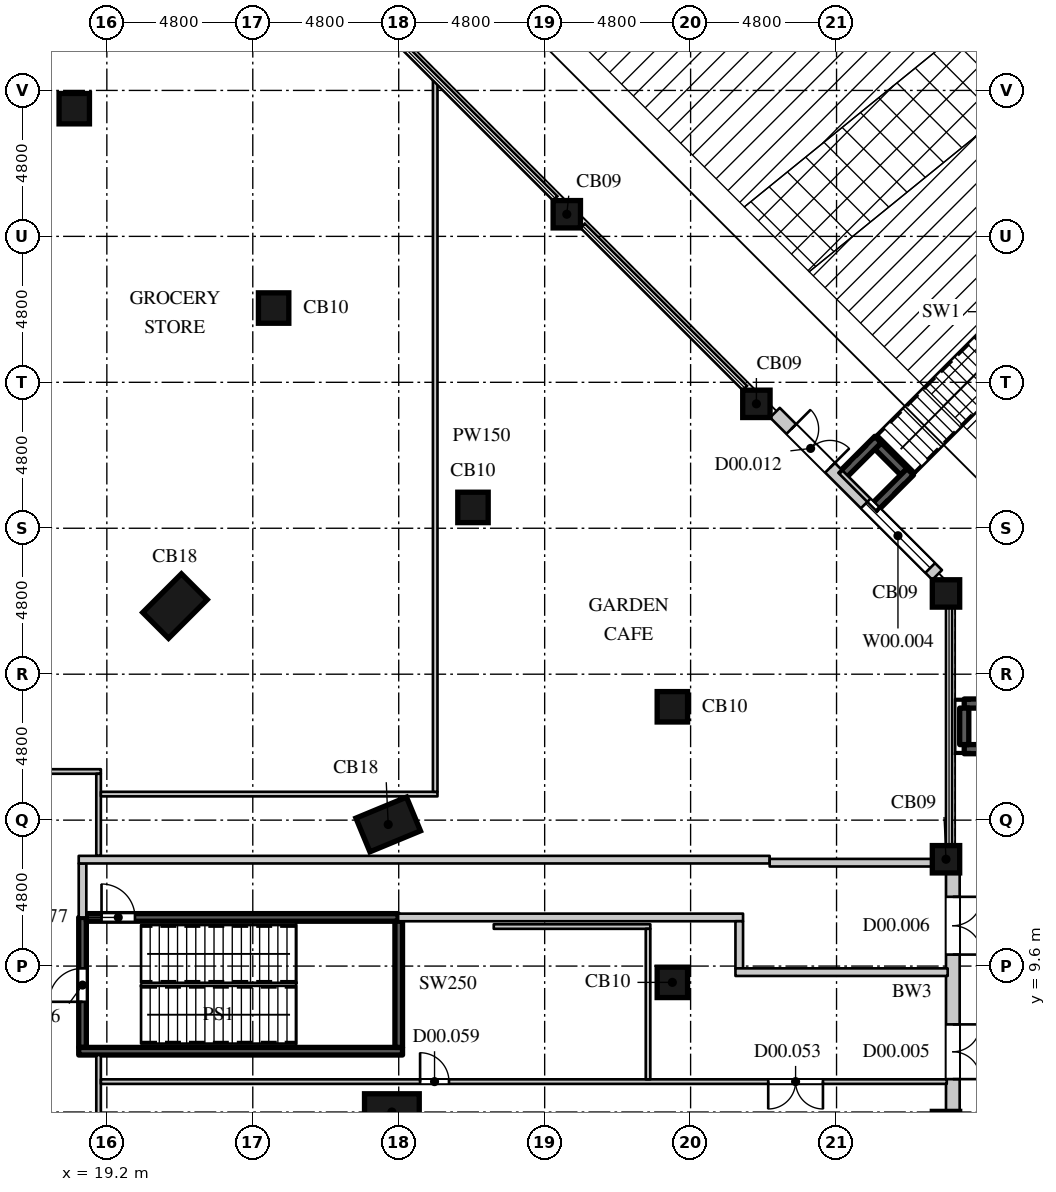
"""IFC4 building model, lengths in metres.
Left out: names, types, materials, properties, quantities, classifications, styles, units other than length and angle.
Written with IfcOpenShell. Run it as: python <this file> out.ifc"""

import sys

from ifc_helpers import new_model, si_unit, direction, frame, frame_2d, origin, origin_2d, place, context, subcontext, project, spatial, rectangle, extrude, element, fill, save


model = new_model("IFC4")
c1 = context("Model", 3, precision=1e-05, world=origin(), true_north=direction((0.0, 1.0)))
c2 = subcontext(c1, "Body", "Model", "MODEL_VIEW")
j1 = project(units=[si_unit("LENGTHUNIT", "METRE"), si_unit("PLANEANGLEUNIT", "RADIAN")], contexts=[c1])
p1 = place(None, origin())
s1 = spatial("IfcSite", under=j1, at=p1, CompositionType="ELEMENT")
p2 = place(p1, origin())
s2 = spatial("IfcBuilding", under=s1, at=p2, CompositionType="ELEMENT")
p3 = place(p2, origin())
s3 = spatial("IfcBuildingStorey", under=s2, at=p3, CompositionType="ELEMENT", Elevation=0.0)
p4 = place(p3, frame((46.8, 4.371, 0.0), z_axis=(0.0, 0.0, 1.0), x_axis=(1.0, 0.0, 0.0)))
e1 = element("IfcColumn", 1, at=p4, inside=s3, PredefinedType="COLUMN", context=c2, shape_type="SweptSolid", body=[
    extrude(rectangle(XDim=0.9, YDim=0.9, at=origin_2d()), origin(), (0.0, 0.0, 1.0), 6.0),
])
p5 = place(p3, frame((28.575, 4.8, 0.0), z_axis=(0.0, 0.0, 1.0), x_axis=(0.0, 1.0, 0.0)))
e2 = element("IfcColumn", 2, at=p5, inside=s3, PredefinedType="COLUMN", context=c2, shape_type="SweptSolid", body=[
    extrude(rectangle(XDim=1.2, YDim=1.8, at=origin_2d()), origin(), (0.0, 0.0, 1.0), 6.0),
])
p6 = place(p3, frame((37.8, 9.064, 0.0), z_axis=(0.0, 0.0, 1.0), x_axis=(1.0, 0.0, 0.0)))
e3 = element("IfcColumn", 3, at=p6, inside=s3, PredefinedType="COLUMN", context=c2, shape_type="SweptSolid", body=[
    extrude(rectangle(XDim=1.0, YDim=1.0, at=origin_2d()), origin(), (0.0, 0.0, 1.0), 6.0),
])
p7 = place(p3, frame((46.8, 13.114, 0.0), z_axis=(0.0, 0.0, 1.0), x_axis=(1.0, 0.0, 0.0)))
e4 = element("IfcColumn", 4, at=p7, inside=s3, PredefinedType="COLUMN", context=c2, shape_type="SweptSolid", body=[
    extrude(rectangle(XDim=0.9, YDim=0.9, at=origin_2d()), origin(), (0.0, 0.0, 1.0), 6.0),
])
p8 = place(p3, frame((28.454, 14.257, 0.0), z_axis=(0.0, 0.0, 1.0), x_axis=(-0.382683496864, 0.923879505795, 0.0)))
e5 = element("IfcColumn", 5, at=p8, inside=s3, PredefinedType="COLUMN", context=c2, shape_type="SweptSolid", body=[
    extrude(rectangle(XDim=1.2, YDim=1.8, at=origin_2d()), origin(), (0.0, 0.0, 1.0), 6.0),
])
p9 = place(p3, frame((37.8, 18.128, 0.0), z_axis=(0.0, 0.0, 1.0), x_axis=(1.0, 0.0, 0.0)))
e6 = element("IfcColumn", 6, at=p9, inside=s3, PredefinedType="COLUMN", context=c2, shape_type="SweptSolid", body=[
    extrude(rectangle(XDim=1.0, YDim=1.0, at=origin_2d()), origin(), (0.0, 0.0, 1.0), 6.0),
])
p10 = place(p3, frame((21.441, 21.441, 0.0), z_axis=(0.0, 0.0, 1.0), x_axis=(-0.707106781187, 0.707106781187, 0.0)))
e7 = element("IfcColumn", 7, at=p10, inside=s3, PredefinedType="COLUMN", context=c2, shape_type="SweptSolid", body=[
    extrude(rectangle(XDim=1.2, YDim=1.8, at=origin_2d()), origin(), (0.0, 0.0, 1.0), 6.0),
])
p11 = place(p3, frame((46.8, 21.856, 0.0), z_axis=(0.0, 0.0, 1.0), x_axis=(1.0, 0.0, 0.0)))
e8 = element("IfcColumn", 8, at=p11, inside=s3, PredefinedType="COLUMN", context=c2, shape_type="SweptSolid", body=[
    extrude(rectangle(XDim=0.9, YDim=0.9, at=origin_2d()), origin(), (0.0, 0.0, 1.0), 6.0),
])
p12 = place(p3, frame((31.243, 24.685, 0.0), z_axis=(0.0, 0.0, 1.0), x_axis=(1.0, 0.0, 0.0)))
e9 = element("IfcColumn", 9, at=p12, inside=s3, PredefinedType="COLUMN", context=c2, shape_type="SweptSolid", body=[
    extrude(rectangle(XDim=1.0, YDim=1.0, at=origin_2d()), origin(), (0.0, 0.0, 1.0), 6.0),
])
p13 = place(p3, frame((40.564, 28.092, 0.0), z_axis=(0.0, 0.0, 1.0), x_axis=(1.0, 0.0, 0.0)))
e10 = element("IfcColumn", 10, at=p13, inside=s3, PredefinedType="COLUMN", context=c2, shape_type="SweptSolid", body=[
    extrude(rectangle(XDim=0.9, YDim=0.9, at=origin_2d()), origin(), (0.0, 0.0, 1.0), 6.0),
])
p14 = place(p3, frame((24.685, 31.243, 0.0), z_axis=(0.0, 0.0, 1.0), x_axis=(1.0, 0.0, 0.0)))
e11 = element("IfcColumn", 11, at=p14, inside=s3, PredefinedType="COLUMN", context=c2, shape_type="SweptSolid", body=[
    extrude(rectangle(XDim=1.0, YDim=1.0, at=origin_2d()), origin(), (0.0, 0.0, 1.0), 6.0),
])
p15 = place(p3, frame((34.328, 34.328, 0.0), z_axis=(0.0, 0.0, 1.0), x_axis=(1.0, 0.0, 0.0)))
e12 = element("IfcColumn", 12, at=p15, inside=s3, PredefinedType="COLUMN", context=c2, shape_type="SweptSolid", body=[
    extrude(rectangle(XDim=0.9, YDim=0.9, at=origin_2d()), origin(), (0.0, 0.0, 1.0), 6.0),
])
p16 = place(p3, frame((18.128, 37.8, 0.0), z_axis=(0.0, 0.0, 1.0), x_axis=(1.0, 0.0, 0.0)))
e13 = element("IfcColumn", 13, at=p16, inside=s3, PredefinedType="COLUMN", context=c2, shape_type="SweptSolid", body=[
    extrude(rectangle(XDim=1.0, YDim=1.0, at=origin_2d()), origin(), (0.0, 0.0, 1.0), 6.0),
])
p17 = place(p3, frame((47.025, 4.821, 0.0), z_axis=(0.0, 0.0, 1.0), x_axis=(0.0, 1.0, 0.0)))
e14 = element("IfcWall", 14, at=p17, inside=s3, PredefinedType="ELEMENTEDWALL", context=c2, shape_type="SweptSolid", body=[
    extrude(rectangle(XDim=7.842, YDim=0.45, at=frame_2d((3.921, 0.0))), origin(), (0.0, 0.0, 1.0), 4.8),
])
p18 = place(p17, frame((1.061, 0.0, 0.0)))
e15 = element("IfcOpeningElement", 15, at=p18, cuts=e14, PredefinedType="OPENING", context=c2, shape_type="SweptSolid", body=[
    extrude(rectangle(XDim=1.8, YDim=2.7, at=frame_2d((0.9, 1.35))), frame((0.0, 0.235, 0.0), z_axis=(0.0, -1.0, 0.0), x_axis=(1.0, 0.0, 0.0)), (0.0, 0.0, 1.0), 0.47),
])
p19 = place(p17, frame((5.157, 0.0, 0.0)))
e16 = element("IfcOpeningElement", 16, at=p19, cuts=e14, PredefinedType="OPENING", context=c2, shape_type="SweptSolid", body=[
    extrude(rectangle(XDim=1.9, YDim=2.7, at=frame_2d((0.95, 1.35))), frame((0.0, 0.235, 0.0), z_axis=(0.0, -1.0, 0.0), x_axis=(1.0, 0.0, 0.0)), (0.0, 0.0, 1.0), 0.47),
])
p20 = place(p3, frame((46.509, 22.465, 0.0), z_axis=(0.0, 0.0, 1.0), x_axis=(-0.70709060488, 0.707122957123, 0.0)))
e17 = element("IfcWall", 17, at=p20, inside=s3, PredefinedType="ELEMENTEDWALL", context=c2, shape_type="SweptSolid", body=[
    extrude(rectangle(XDim=7.546, YDim=0.45, at=frame_2d((3.773, 0.0))), origin(), (0.0, 0.0, 1.0), 4.8),
])
p21 = place(p20, frame((0.323, 0.0, 1.05)))
e18 = element("IfcOpeningElement", 18, at=p21, cuts=e17, PredefinedType="OPENING", context=c2, shape_type="SweptSolid", body=[
    extrude(rectangle(XDim=3.0, YDim=2.7, at=frame_2d((1.5, 1.35))), frame((0.0, 0.235, 0.0), z_axis=(0.0, -1.0, 0.0), x_axis=(1.0, 0.0, 0.0)), (0.0, 0.0, 1.0), 0.47),
])
p22 = place(p20, frame((4.985, 0.0, 0.0)))
e19 = element("IfcOpeningElement", 19, at=p22, cuts=e17, PredefinedType="OPENING", context=c2, shape_type="SweptSolid", body=[
    extrude(rectangle(XDim=1.8, YDim=2.7, at=frame_2d((0.9, 1.35))), frame((0.0, 0.235, 0.0), z_axis=(0.0, -1.0, 0.0), x_axis=(1.0, 0.0, 0.0)), (0.0, 0.0, 1.0), 0.47),
])
for number, where, z_axis, x_axis in (
    (20, (44.495, 24.726, 0.0), (0.0, 0.0, 1.0), (0.707, 0.707, 0.0)),
    (21, (43.435, 25.787, 0.0), (0.0, 0.0, 1.0), (0.707, 0.707, 0.0)),
):
    element("IfcWall", number, at=place(p3, frame(where, z_axis=z_axis, x_axis=x_axis)), inside=s3, PredefinedType="SOLIDWALL", context=c2, shape_type="SweptSolid", body=[
        extrude(rectangle(XDim=1.6, YDim=0.3, at=frame_2d((0.8, 0.0))), origin(), (0.0, 0.0, 1.0), 5.8),
    ])
p23 = place(p3, frame((45.414, 25.858, 0.0), z_axis=(0.0, 0.0, 1.0), x_axis=(-0.707005046524, 0.707208501214, 0.0)))
e22 = element("IfcWall", 22, at=p23, inside=s3, PredefinedType="SOLIDWALL", context=c2, shape_type="SweptSolid", body=[
    extrude(rectangle(XDim=1.2, YDim=0.3, at=frame_2d((0.6, 0.0))), origin(), (0.0, 0.0, 1.0), 5.8),
])
p24 = place(p3, frame((11.125, 16.0, 0.0), z_axis=(0.0, 0.0, 1.0), x_axis=(1.0, 0.0, 0.0)))
e23 = element("IfcWall", 23, at=p24, inside=s3, PredefinedType="PARTITIONING", context=c2, shape_type="SweptSolid", body=[
    extrude(rectangle(XDim=7.878, YDim=0.15, at=frame_2d((3.939, 0.0))), origin(), (0.0, 0.0, 1.0), 5.65),
])
p25 = place(p3, frame((18.928, -6.675, 0.0), z_axis=(0.0, 0.0, 1.0), x_axis=(0.0, 1.0, 0.0)))
e24 = element("IfcWall", 24, at=p25, inside=s3, PredefinedType="PARTITIONING", context=c2, shape_type="SweptSolid", body=[
    extrude(rectangle(XDim=13.35, YDim=0.15, at=frame_2d((6.675, 0.0))), origin(), (0.0, 0.0, 1.0), 5.65),
])
p26 = place(p25, frame((7.05, 0.0, 0.0)))
e25 = element("IfcOpeningElement", 25, at=p26, cuts=e24, PredefinedType="OPENING", context=c2, shape_type="SweptSolid", body=[
    extrude(rectangle(XDim=1.5, YDim=2.2, at=frame_2d((0.75, 1.1))), frame((0.0, 0.085, 0.0), z_axis=(0.0, -1.0, 0.0), x_axis=(1.0, 0.0, 0.0)), (0.0, 0.0, 1.0), 0.17),
])
p27 = place(p3, frame((19.003, 5.8, 0.0), z_axis=(0.0, 0.0, 1.0), x_axis=(1.0, 0.0, 0.0)))
e26 = element("IfcWall", 26, at=p27, inside=s3, PredefinedType="PARTITIONING", context=c2, shape_type="SweptSolid", body=[
    extrude(rectangle(XDim=27.822, YDim=0.15, at=frame_2d((13.911, 0.0))), origin(), (0.0, 0.0, 1.0), 5.65),
])
p28 = place(p27, frame((21.95, 0.0, 0.0)))
e27 = element("IfcOpeningElement", 27, at=p28, cuts=e26, PredefinedType="OPENING", context=c2, shape_type="SweptSolid", body=[
    extrude(rectangle(XDim=1.8, YDim=2.4, at=frame_2d((0.9, 1.2))), frame((0.0, 0.085, 0.0), z_axis=(0.0, -1.0, 0.0), x_axis=(1.0, 0.0, 0.0)), (0.0, 0.0, 1.0), 0.17),
])
p29 = place(p27, frame((10.5, 0.0, 0.0)))
e28 = element("IfcOpeningElement", 28, at=p29, cuts=e26, PredefinedType="OPENING", context=c2, shape_type="SweptSolid", body=[
    extrude(rectangle(XDim=0.95, YDim=2.2, at=frame_2d((0.475, 1.1))), frame((0.0, 0.085, 0.0), z_axis=(0.0, -1.0, 0.0), x_axis=(1.0, 0.0, 0.0)), (0.0, 0.0, 1.0), 0.17),
])
p30 = place(p3, frame((18.928, 13.225, 0.0), z_axis=(0.0, 0.0, 1.0), x_axis=(0.0, 1.0, 0.0)))
e29 = element("IfcWall", 29, at=p30, inside=s3, PredefinedType="PARTITIONING", context=c2, shape_type="SweptSolid", body=[
    extrude(rectangle(XDim=2.7, YDim=0.15, at=frame_2d((1.35, 0.0))), origin(), (0.0, 0.0, 1.0), 5.65),
])
p31 = place(p3, frame((19.003, 15.257, 0.0), z_axis=(0.0, 0.0, 1.0), x_axis=(1.0, 0.0, 0.0)))
e30 = element("IfcWall", 30, at=p31, inside=s3, PredefinedType="PARTITIONING", context=c2, shape_type="SweptSolid", body=[
    extrude(rectangle(XDim=11.072, YDim=0.15, at=frame_2d((5.536, 0.0))), origin(), (0.0, 0.0, 1.0), 5.65),
])
p32 = place(p3, frame((30.0, 15.332, 0.0), z_axis=(0.0, 0.0, 1.0), x_axis=(0.0, 1.0, 0.0)))
e31 = element("IfcWall", 31, at=p32, inside=s3, PredefinedType="PARTITIONING", context=c2, shape_type="SweptSolid", body=[
    extrude(rectangle(XDim=23.402, YDim=0.15, at=frame_2d((11.701, 0.0))), origin(), (0.0, 0.0, 1.0), 5.65),
])
p33 = place(p3, frame((31.926, 10.9, 0.0), z_axis=(0.0, 0.0, 1.0), x_axis=(1.0, 0.0, 0.0)))
e32 = element("IfcWall", 32, at=p33, inside=s3, PredefinedType="PARTITIONING", context=c2, shape_type="SweptSolid", body=[
    extrude(rectangle(XDim=5.149, YDim=0.15, at=frame_2d((2.574, 0.0))), origin(), (0.0, 0.0, 1.0), 5.65),
])
p34 = place(p3, frame((37.0, 5.875, 0.0), z_axis=(0.0, 0.0, 1.0), x_axis=(0.0, 1.0, 0.0)))
e33 = element("IfcWall", 33, at=p34, inside=s3, PredefinedType="PARTITIONING", context=c2, shape_type="SweptSolid", body=[
    extrude(rectangle(XDim=4.95, YDim=0.15, at=frame_2d((2.475, 0.0))), origin(), (0.0, 0.0, 1.0), 5.65),
])
p35 = place(p3, frame((18.4, 6.925, 0.0), z_axis=(0.0, 0.0, 1.0), x_axis=(0.0, 1.0, 0.0)))
e34 = element("IfcWall", 34, at=p35, inside=s3, PredefinedType="SHEAR", context=c2, shape_type="SweptSolid", body=[
    extrude(rectangle(XDim=4.275, YDim=0.25, at=frame_2d((2.137, 0.0))), origin(), (0.0, 0.0, 1.0), 5.65),
])
p36 = place(p35, frame((1.5, 0.0, 0.0)))
e35 = element("IfcOpeningElement", 35, at=p36, cuts=e34, PredefinedType="OPENING", context=c2, shape_type="SweptSolid", body=[
    extrude(rectangle(XDim=1.1, YDim=2.2, at=frame_2d((0.55, 1.1))), frame((0.0, 0.135, 0.0), z_axis=(0.0, -1.0, 0.0), x_axis=(1.0, 0.0, 0.0)), (0.0, 0.0, 1.0), 0.27),
])
p37 = place(p3, frame((18.275, 6.8, 0.0), z_axis=(0.0, 0.0, 1.0), x_axis=(1.0, 0.0, 0.0)))
e36 = element("IfcWall", 36, at=p37, inside=s3, PredefinedType="SHEAR", context=c2, shape_type="SweptSolid", body=[
    extrude(rectangle(XDim=10.65, YDim=0.25, at=frame_2d((5.325, 0.0))), origin(), (0.0, 0.0, 1.0), 5.65),
])
p38 = place(p3, frame((18.525, 11.2, 0.0), z_axis=(0.0, 0.0, 1.0), x_axis=(1.0, 0.0, 0.0)))
e37 = element("IfcWall", 37, at=p38, inside=s3, PredefinedType="SHEAR", context=c2, shape_type="SweptSolid", body=[
    extrude(rectangle(XDim=10.255, YDim=0.25, at=frame_2d((5.127, 0.0))), origin(), (0.0, 0.0, 1.0), 5.65),
])
p39 = place(p38, frame((0.5, 0.0, 0.0)))
e38 = element("IfcOpeningElement", 38, at=p39, cuts=e37, PredefinedType="OPENING", context=c2, shape_type="SweptSolid", body=[
    extrude(rectangle(XDim=1.1, YDim=2.2, at=frame_2d((0.55, 1.1))), frame((0.0, 0.135, 0.0), z_axis=(0.0, -1.0, 0.0), x_axis=(1.0, 0.0, 0.0)), (0.0, 0.0, 1.0), 0.27),
])
p40 = place(p3, frame((28.8, 6.925, 0.0), z_axis=(0.0, 0.0, 1.0), x_axis=(0.0, 1.0, 0.0)))
e39 = element("IfcWall", 39, at=p40, inside=s3, PredefinedType="SHEAR", context=c2, shape_type="SweptSolid", body=[
    extrude(rectangle(XDim=4.15, YDim=0.25, at=frame_2d((2.075, 0.0))), origin(), (0.0, 0.0, 1.0), 5.65),
])
p41 = place(p3, frame((18.4, 11.2, 0.0), z_axis=(0.0, 0.0, 1.0), x_axis=(0.0, 1.0, 0.0)))
e40 = element("IfcWall", 40, at=p41, inside=s3, PredefinedType="PARTITIONING", context=c2, shape_type="SweptSolid", body=[
    extrude(rectangle(XDim=1.775, YDim=0.25, at=frame_2d((0.888, 0.0))), origin(), (0.0, 0.0, 1.0), 5.65),
])
p42 = place(p3, frame((18.275, 13.1, 0.0), z_axis=(0.0, 0.0, 1.0), x_axis=(1.0, 0.0, 0.0)))
e41 = element("IfcWall", 41, at=p42, inside=s3, PredefinedType="PARTITIONING", context=c2, shape_type="SweptSolid", body=[
    extrude(rectangle(XDim=22.725, YDim=0.25, at=frame_2d((11.363, 0.0))), origin(), (0.0, 0.0, 1.0), 5.65),
])
p43 = place(p3, frame((28.78, 11.2, 0.0), z_axis=(0.0, 0.0, 1.0), x_axis=(1.0, 0.0, 0.0)))
e42 = element("IfcWall", 42, at=p43, inside=s3, PredefinedType="PARTITIONING", context=c2, shape_type="SweptSolid", body=[
    extrude(rectangle(XDim=11.345, YDim=0.25, at=frame_2d((5.672, 0.0))), origin(), (0.0, 0.0, 1.0), 5.65),
])
p44 = place(p3, frame((40.0, 9.525, 0.0), z_axis=(0.0, 0.0, 1.0), x_axis=(0.0, 1.0, 0.0)))
e43 = element("IfcWall", 43, at=p44, inside=s3, PredefinedType="PARTITIONING", context=c2, shape_type="SweptSolid", body=[
    extrude(rectangle(XDim=1.55, YDim=0.25, at=frame_2d((0.775, 0.0))), origin(), (0.0, 0.0, 1.0), 5.65),
])
p45 = place(p3, frame((39.875, 9.4, 0.0), z_axis=(0.0, 0.0, 1.0), x_axis=(1.0, 0.0, 0.0)))
e44 = element("IfcWall", 44, at=p45, inside=s3, PredefinedType="PARTITIONING", context=c2, shape_type="SweptSolid", body=[
    extrude(rectangle(XDim=6.98, YDim=0.25, at=frame_2d((3.49, 0.0))), origin(), (0.0, 0.0, 1.0), 5.65),
])
p46 = place(p3, frame((41.0, 13.0, 0.0), z_axis=(0.0, 0.0, 1.0), x_axis=(1.0, 0.0, 0.0)))
e45 = element("IfcWall", 45, at=p46, inside=s3, PredefinedType="PARTITIONING", context=c2, shape_type="SweptSolid", body=[
    extrude(rectangle(XDim=5.35, YDim=0.25, at=frame_2d((2.675, 0.0))), origin(), (0.0, 0.0, 1.0), 5.65),
])
for number, where, z_axis, x_axis in (
    (46, (47.4, 16.735, 0.0), (0.0, 0.0, 1.0), (1.0, 0.0, 0.0)),
    (47, (47.4, 18.235, 0.0), (0.0, 0.0, 1.0), (1.0, 0.0, 0.0)),
):
    element("IfcWall", number, at=place(p3, frame(where, z_axis=z_axis, x_axis=x_axis)), inside=s3, PredefinedType="SOLIDWALL", context=c2, shape_type="SweptSolid", body=[
        extrude(rectangle(XDim=1.35, YDim=0.3, at=frame_2d((0.675, 0.0))), origin(), (0.0, 0.0, 1.0), 5.8),
    ])
p47 = place(p3, frame((47.4, 16.885, 0.0), z_axis=(0.0, 0.0, 1.0), x_axis=(0.0, 1.0, 0.0)))
e48 = element("IfcWall", 48, at=p47, inside=s3, PredefinedType="SOLIDWALL", context=c2, shape_type="SweptSolid", body=[
    extrude(rectangle(XDim=1.2, YDim=0.3, at=frame_2d((0.6, 0.0))), origin(), (0.0, 0.0, 1.0), 5.8),
])
p48 = place(p18, frame((1.8, 0.0, 0.0), z_axis=(0.0, 0.0, 1.0), x_axis=(-1.0, 0.0, 0.0)))
e49 = element("IfcDoor", 49, at=p48, inside=s3, OperationType="DOUBLE_DOOR_SINGLE_SWING", PredefinedType="DOOR", context=c2, shape_type="SweptSolid", body=[
    extrude(rectangle(XDim=1.8, YDim=2.7, at=frame_2d((0.9, 1.35))), frame((0.0, -0.08, 0.0), z_axis=(0.0, -1.0, 0.0), x_axis=(1.0, 0.0, 0.0)), (0.0, 0.0, 1.0), 0.05),
])
fill(e15, e49)
p49 = place(p19, frame((1.9, 0.0, 0.0), z_axis=(0.0, 0.0, 1.0), x_axis=(-1.0, 0.0, 0.0)))
e50 = element("IfcDoor", 50, at=p49, inside=s3, OperationType="DOUBLE_DOOR_SINGLE_SWING", PredefinedType="DOOR", context=c2, shape_type="SweptSolid", body=[
    extrude(rectangle(XDim=1.9, YDim=2.7, at=frame_2d((0.95, 1.35))), frame((0.0, -0.08, 0.0), z_axis=(0.0, -1.0, 0.0), x_axis=(1.0, 0.0, 0.0)), (0.0, 0.0, 1.0), 0.05),
])
fill(e16, e50)
p50 = place(p21, origin())
e51 = element("IfcWindow", 51, at=p50, inside=s3, PartitioningType="SINGLE_PANEL", PredefinedType="WINDOW", context=c2, shape_type="SweptSolid", body=[
    extrude(rectangle(XDim=3.0, YDim=2.7, at=frame_2d((1.5, 1.35))), frame((0.0, 0.135, 0.0), z_axis=(0.0, -1.0, 0.0), x_axis=(1.0, 0.0, 0.0)), (0.0, 0.0, 1.0), 0.06),
])
fill(e18, e51)
p51 = place(p22, frame((1.8, 0.0, 0.0), z_axis=(0.0, 0.0, 1.0), x_axis=(-1.0, 0.0, 0.0)))
e52 = element("IfcDoor", 52, at=p51, inside=s3, OperationType="DOUBLE_DOOR_SINGLE_SWING", PredefinedType="DOOR", context=c2, shape_type="SweptSolid", body=[
    extrude(rectangle(XDim=1.8, YDim=2.7, at=frame_2d((0.9, 1.35))), frame((0.0, -0.08, 0.0), z_axis=(0.0, -1.0, 0.0), x_axis=(1.0, 0.0, 0.0)), (0.0, 0.0, 1.0), 0.05),
])
fill(e19, e52)
p52 = place(p28, origin())
e53 = element("IfcDoor", 53, at=p52, inside=s3, OperationType="DOUBLE_DOOR_SINGLE_SWING", PredefinedType="DOOR", context=c2, shape_type="SweptSolid", body=[
    extrude(rectangle(XDim=1.8, YDim=2.4, at=frame_2d((0.9, 1.2))), frame((0.0, 0.025, 0.0), z_axis=(0.0, -1.0, 0.0), x_axis=(1.0, 0.0, 0.0)), (0.0, 0.0, 1.0), 0.05),
])
fill(e27, e53)
p53 = place(p29, origin())
e54 = element("IfcDoor", 54, at=p53, inside=s3, OperationType="SINGLE_SWING_LEFT", PredefinedType="DOOR", context=c2, shape_type="SweptSolid", body=[
    extrude(rectangle(XDim=0.95, YDim=2.2, at=frame_2d((0.475, 1.1))), frame((0.0, 0.025, 0.0), z_axis=(0.0, -1.0, 0.0), x_axis=(1.0, 0.0, 0.0)), (0.0, 0.0, 1.0), 0.05),
])
fill(e28, e54)
p54 = place(p36, origin())
e55 = element("IfcDoor", 55, at=p54, inside=s3, OperationType="SINGLE_SWING_LEFT", PredefinedType="DOOR", context=c2, shape_type="SweptSolid", body=[
    extrude(rectangle(XDim=1.1, YDim=2.2, at=frame_2d((0.55, 1.1))), frame((0.0, 0.025, 0.0), z_axis=(0.0, -1.0, 0.0), x_axis=(1.0, 0.0, 0.0)), (0.0, 0.0, 1.0), 0.05),
])
fill(e35, e55)
p55 = place(p39, origin())
e56 = element("IfcDoor", 56, at=p55, inside=s3, OperationType="SINGLE_SWING_LEFT", PredefinedType="DOOR", context=c2, shape_type="SweptSolid", body=[
    extrude(rectangle(XDim=1.1, YDim=2.2, at=frame_2d((0.55, 1.1))), frame((0.0, 0.025, 0.0), z_axis=(0.0, -1.0, 0.0), x_axis=(1.0, 0.0, 0.0)), (0.0, 0.0, 1.0), 0.05),
])
fill(e38, e56)
save(model, sys.argv[1])
